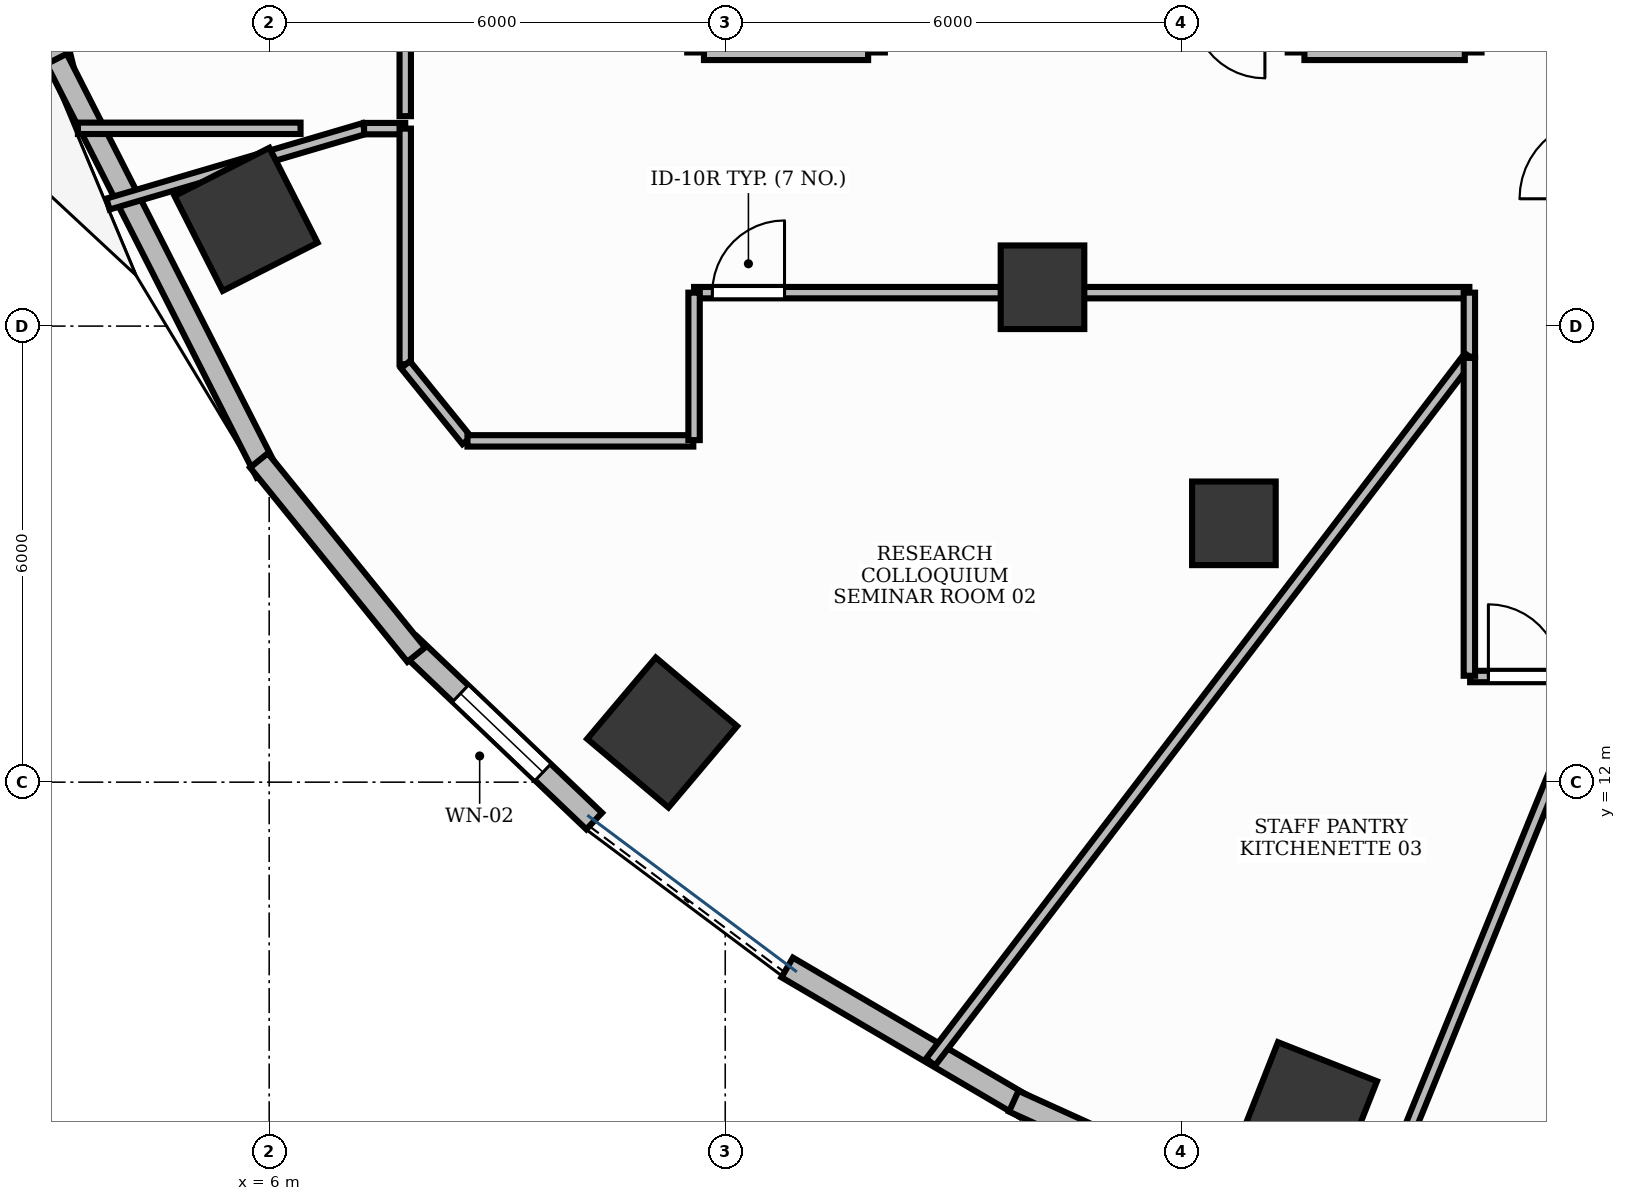
"""IFC4 building model, lengths in metres.
Left out: names, types, materials, properties, quantities, classifications, styles, units other than length and angle.
Written with IfcOpenShell. Run it as: python <this file> out.ifc"""

import sys

from ifc_helpers import new_model, si_unit, direction, frame, frame_2d, origin, origin_2d, place, context, subcontext, project, spatial, rectangle, extrude, element, fill, save


model = new_model("IFC4")
c1 = context("Model", 3, precision=1e-05, world=origin(), true_north=direction((0.0, 1.0)))
c2 = subcontext(c1, "Body", "Model", "MODEL_VIEW")
j1 = project(units=[si_unit("LENGTHUNIT", "METRE"), si_unit("PLANEANGLEUNIT", "RADIAN")], contexts=[c1])
p1 = place(None, origin())
s1 = spatial("IfcSite", under=j1, at=p1, CompositionType="ELEMENT")
p2 = place(p1, origin())
s2 = spatial("IfcBuilding", under=s1, at=p2, CompositionType="ELEMENT")
p3 = place(p2, frame((0.0, 0.0, 38.4)))
s3 = spatial("IfcBuildingStorey", under=s2, at=p3, CompositionType="ELEMENT", Elevation=38.4)
p4 = place(p3, frame((5.696, 19.404, -0.0), z_axis=(0.0, 0.0, 1.0), x_axis=(-0.453057191132, 0.891481453292, 0.0)))
e1 = element("IfcColumn", 1, at=p4, inside=s3, PredefinedType="COLUMN", context=c2, shape_type="SweptSolid", body=[
    extrude(rectangle(XDim=1.4, YDim=1.4, at=origin_2d()), origin(), (0.0, 0.0, 1.0), 3.901),
])
p5 = place(p3, frame((16.174, 18.511, -0.0), z_axis=(0.0, 0.0, 1.0), x_axis=(1.0, 0.0, 0.0)))
e2 = element("IfcColumn", 2, at=p5, inside=s3, PredefinedType="COLUMN", context=c2, shape_type="SweptSolid", body=[
    extrude(rectangle(XDim=1.1, YDim=1.1, at=origin_2d()), origin(), (0.0, 0.0, 1.0), 3.901),
])
p6 = place(p3, frame((11.17, 12.653, -0.0), z_axis=(0.0, 0.0, 1.0), x_axis=(-0.764246456939, 0.644924300253, 0.0)))
e3 = element("IfcColumn", 3, at=p6, inside=s3, PredefinedType="COLUMN", context=c2, shape_type="SweptSolid", body=[
    extrude(rectangle(XDim=1.4, YDim=1.4, at=origin_2d()), origin(), (0.0, 0.0, 1.0), 3.901),
])
p7 = place(p3, frame((18.692, 15.405, -0.0), z_axis=(0.0, 0.0, 1.0), x_axis=(1.0, 0.0, 0.0)))
e4 = element("IfcColumn", 4, at=p7, inside=s3, PredefinedType="COLUMN", context=c2, shape_type="SweptSolid", body=[
    extrude(rectangle(XDim=1.1, YDim=1.1, at=origin_2d()), origin(), (0.0, 0.0, 1.0), 3.901),
])
p8 = place(p3, frame((19.667, 7.671, -0.0), z_axis=(0.0, 0.0, 1.0), x_axis=(-0.930225540858, 0.366988341962, 0.0)))
e5 = element("IfcColumn", 5, at=p8, inside=s3, PredefinedType="COLUMN", context=c2, shape_type="SweptSolid", body=[
    extrude(rectangle(XDim=1.4, YDim=1.4, at=origin_2d()), origin(), (0.0, 0.0, 1.0), 3.901),
])
p9 = place(p3, frame((2.571, 24.266, 0.0), z_axis=(0.0, 0.0, 1.0), x_axis=(0.238522035896, -0.971137085273, 0.0)))
e6 = element("IfcWall", 6, at=p9, inside=s3, PredefinedType="STANDARD", context=c2, shape_type="SweptSolid", body=[
    extrude(rectangle(XDim=2.993, YDim=0.3, at=frame_2d((1.497, 0.0))), origin(), (0.0, 0.0, 1.0), 3.9),
])
p10 = place(p9, frame((0.946, 0.0, 0.0)))
e7 = element("IfcOpeningElement", 7, at=p10, cuts=e6, PredefinedType="OPENING", context=c2, shape_type="SweptSolid", body=[
    extrude(rectangle(XDim=1.1, YDim=2.15, at=frame_2d((0.55, 1.075))), frame((0.0, 0.165, 0.0), z_axis=(0.0, -1.0, 0.0), x_axis=(1.0, 0.0, 0.0)), (0.0, 0.0, 1.0), 0.33),
])
p11 = place(p3, frame((7.842, 13.809, 0.0), z_axis=(0.0, 0.0, 1.0), x_axis=(0.723678516117, -0.690137236578, 0.0)))
e8 = element("IfcWall", 8, at=p11, inside=s3, PredefinedType="STANDARD", context=c2, shape_type="SweptSolid", body=[
    extrude(rectangle(XDim=3.363, YDim=0.3, at=frame_2d((1.681, 0.0))), origin(), (0.0, 0.0, 1.0), 3.9),
])
p12 = place(p11, frame((0.931, 0.0, 0.95)))
e9 = element("IfcOpeningElement", 9, at=p12, cuts=e8, PredefinedType="OPENING", context=c2, shape_type="SweptSolid", body=[
    extrude(rectangle(XDim=1.5, YDim=1.8, at=frame_2d((0.75, 0.9))), frame((0.0, 0.165, 0.0), z_axis=(0.0, -1.0, 0.0), x_axis=(1.0, 0.0, 0.0)), (0.0, 0.0, 1.0), 0.33),
])
p13 = place(p3, frame((3.204, 21.514, 0.0), z_axis=(0.0, 0.0, 1.0), x_axis=(0.453093111502, -0.891463197395, 0.0)))
e10 = element("IfcWall", 10, at=p13, inside=s3, PredefinedType="STANDARD", context=c2, shape_type="SweptSolid", body=[
    extrude(rectangle(XDim=6.102, YDim=0.3, at=frame_2d((3.051, 0.0))), origin(), (0.0, 0.0, 1.0), 3.9),
])
p14 = place(p3, frame((5.866, 16.233, 0.0), z_axis=(0.0, 0.0, 1.0), x_axis=(0.629221727718, -0.777225847079, 0.0)))
e11 = element("IfcWall", 11, at=p14, inside=s3, PredefinedType="STANDARD", context=c2, shape_type="SweptSolid", body=[
    extrude(rectangle(XDim=3.288, YDim=0.3, at=frame_2d((1.644, 0.0))), origin(), (0.0, 0.0, 1.0), 3.9),
])
p15 = place(p3, frame((12.815, 9.562, 0.0), z_axis=(0.0, 0.0, 1.0), x_axis=(0.8624654944, -0.506115867139, 0.0)))
e12 = element("IfcWall", 12, at=p15, inside=s3, PredefinedType="STANDARD", context=c2, shape_type="SweptSolid", body=[
    extrude(rectangle(XDim=3.635, YDim=0.3, at=frame_2d((1.818, 0.0))), origin(), (0.0, 0.0, 1.0), 3.9),
])
p16 = place(p3, frame((15.796, 7.802, 0.0), z_axis=(0.0, 0.0, 1.0), x_axis=(0.910623406862, -0.413237233166, 0.0)))
e13 = element("IfcWall", 13, at=p16, inside=s3, PredefinedType="STANDARD", context=c2, shape_type="SweptSolid", body=[
    extrude(rectangle(XDim=3.74, YDim=0.3, at=frame_2d((1.87, 0.0))), origin(), (0.0, 0.0, 1.0), 3.9),
])
p17 = place(p3, frame((11.72, 21.6, 0.0), z_axis=(0.0, 0.0, 1.0), x_axis=(1.0, 0.0, 0.0)))
e14 = element("IfcWall", 14, at=p17, inside=s3, PredefinedType="PARTITIONING", context=c2, shape_type="SweptSolid", body=[
    extrude(rectangle(XDim=2.16, YDim=0.2, at=frame_2d((1.08, 0.0))), origin(), (0.0, 0.0, 1.0), 2.91),
])
p18 = place(p3, frame((19.62, 21.6, 0.0), z_axis=(0.0, 0.0, 1.0), x_axis=(1.0, 0.0, 0.0)))
e15 = element("IfcWall", 15, at=p18, inside=s3, PredefinedType="PARTITIONING", context=c2, shape_type="SweptSolid", body=[
    extrude(rectangle(XDim=2.11, YDim=0.2, at=frame_2d((1.055, 0.0))), origin(), (0.0, 0.0, 1.0), 2.91),
])
p19 = place(p3, frame((11.59, 18.44, 0.0), z_axis=(0.0, 0.0, 1.0), x_axis=(1.0, 0.0, 0.0)))
e16 = element("IfcWall", 16, at=p19, inside=s3, PredefinedType="PARTITIONING", context=c2, shape_type="SweptSolid", body=[
    extrude(rectangle(XDim=10.2, YDim=0.15, at=frame_2d((5.1, 0.0))), origin(), (0.0, 0.0, 1.0), 2.91),
])
p20 = place(p19, frame((0.24, 0.0, 0.0)))
e17 = element("IfcOpeningElement", 17, at=p20, cuts=e16, PredefinedType="OPENING", context=c2, shape_type="SweptSolid", body=[
    extrude(rectangle(XDim=0.95, YDim=2.15, at=frame_2d((0.475, 1.075))), frame((0.0, 0.09, 0.0), z_axis=(0.0, -1.0, 0.0), x_axis=(1.0, 0.0, 0.0)), (0.0, 0.0, 1.0), 0.18),
])
p21 = place(p3, frame((21.8, 13.39, 0.0), z_axis=(0.0, 0.0, 1.0), x_axis=(1.0, 0.0, 0.0)))
e18 = element("IfcWall", 18, at=p21, inside=s3, PredefinedType="PARTITIONING", context=c2, shape_type="SweptSolid", body=[
    extrude(rectangle(XDim=1.629, YDim=0.15, at=frame_2d((0.814, 0.0))), origin(), (0.0, 0.0, 1.0), 2.91),
])
p22 = place(p21, frame((0.24, 0.0, 0.0)))
e19 = element("IfcOpeningElement", 19, at=p22, cuts=e18, PredefinedType="OPENING", context=c2, shape_type="SweptSolid", body=[
    extrude(rectangle(XDim=0.95, YDim=2.15, at=frame_2d((0.475, 1.075))), frame((0.0, 0.09, 0.0), z_axis=(0.0, -1.0, 0.0), x_axis=(1.0, 0.0, 0.0)), (0.0, 0.0, 1.0), 0.18),
])
p23 = place(p3, frame((7.79, 36.501, 0.0), z_axis=(0.0, 0.0, 1.0), x_axis=(0.0, -1.0, 0.0)))
e20 = element("IfcWall", 20, at=p23, inside=s3, PredefinedType="PARTITIONING", context=c2, shape_type="SweptSolid", body=[
    extrude(rectangle(XDim=15.74, YDim=0.15, at=frame_2d((7.87, 0.0))), origin(), (0.0, 0.0, 1.0), 2.91),
])
p24 = place(p23, frame((5.023, 0.0, 0.0)))
e21 = element("IfcOpeningElement", 21, at=p24, cuts=e20, PredefinedType="OPENING", context=c2, shape_type="SweptSolid", body=[
    extrude(rectangle(XDim=0.95, YDim=2.15, at=frame_2d((0.475, 1.075))), frame((0.0, 0.09, 0.0), z_axis=(0.0, -1.0, 0.0), x_axis=(1.0, 0.0, 0.0)), (0.0, 0.0, 1.0), 0.18),
])
p25 = place(p3, frame((3.879, 19.605, 0.0), z_axis=(0.0, 0.0, 1.0), x_axis=(0.959249199887, 0.282561449097, 0.0)))
e22 = element("IfcWall", 22, at=p25, inside=s3, PredefinedType="PARTITIONING", context=c2, shape_type="SweptSolid", body=[
    extrude(rectangle(XDim=3.512, YDim=0.15, at=frame_2d((1.756, 0.0))), origin(), (0.0, 0.0, 1.0), 2.91),
])
p26 = place(p3, frame((7.249, 20.598, 0.0), z_axis=(0.0, 0.0, 1.0), x_axis=(1.0, 0.0, 0.0)))
e23 = element("IfcWall", 23, at=p26, inside=s3, PredefinedType="PARTITIONING", context=c2, shape_type="SweptSolid", body=[
    extrude(rectangle(XDim=0.542, YDim=0.15, at=frame_2d((0.271, 0.0))), origin(), (0.0, 0.0, 1.0), 2.91),
])
p27 = place(p3, frame((7.79, 20.598, 0.0), z_axis=(0.0, 0.0, 1.0), x_axis=(0.0, -1.0, 0.0)))
e24 = element("IfcWall", 24, at=p27, inside=s3, PredefinedType="PARTITIONING", context=c2, shape_type="SweptSolid", body=[
    extrude(rectangle(XDim=3.099, YDim=0.15, at=frame_2d((1.55, 0.0))), origin(), (0.0, 0.0, 1.0), 2.91),
])
p28 = place(p3, frame((7.792, 17.492, 0.0), z_axis=(0.0, 0.0, 1.0), x_axis=(0.629225554682, -0.777222748854, 0.0)))
e25 = element("IfcWall", 25, at=p28, inside=s3, PredefinedType="PARTITIONING", context=c2, shape_type="SweptSolid", body=[
    extrude(rectangle(XDim=1.285, YDim=0.15, at=frame_2d((0.643, 0.0))), origin(), (0.0, 0.0, 1.0), 2.91),
])
p29 = place(p3, frame((8.609, 16.49, 0.0), z_axis=(0.0, 0.0, 1.0), x_axis=(1.0, 0.0, 0.0)))
e26 = element("IfcWall", 26, at=p29, inside=s3, PredefinedType="PARTITIONING", context=c2, shape_type="SweptSolid", body=[
    extrude(rectangle(XDim=2.971, YDim=0.15, at=frame_2d((1.486, 0.0))), origin(), (0.0, 0.0, 1.0), 2.91),
])
p30 = place(p3, frame((11.59, 16.5, 0.0), z_axis=(0.0, 0.0, 1.0), x_axis=(0.0, 1.0, 0.0)))
e27 = element("IfcWall", 27, at=p30, inside=s3, PredefinedType="PARTITIONING", context=c2, shape_type="SweptSolid", body=[
    extrude(rectangle(XDim=1.94, YDim=0.15, at=frame_2d((0.97, 0.0))), origin(), (0.0, 0.0, 1.0), 2.91),
])
p31 = place(p3, frame((21.79, 18.44, 0.0), z_axis=(0.0, 0.0, 1.0), x_axis=(0.0, -1.0, 0.0)))
e28 = element("IfcWall", 28, at=p31, inside=s3, PredefinedType="PARTITIONING", context=c2, shape_type="SweptSolid", body=[
    extrude(rectangle(XDim=0.842, YDim=0.15, at=frame_2d((0.421, 0.0))), origin(), (0.0, 0.0, 1.0), 2.91),
])
p32 = place(p3, frame((21.79, 17.598, 0.0), z_axis=(0.0, 0.0, 1.0), x_axis=(-0.606985155119, -0.794713169304, 0.0)))
e29 = element("IfcWall", 29, at=p32, inside=s3, PredefinedType="PARTITIONING", context=c2, shape_type="SweptSolid", body=[
    extrude(rectangle(XDim=11.677, YDim=0.15, at=frame_2d((5.839, 0.0))), origin(), (0.0, 0.0, 1.0), 2.91),
])
p33 = place(p3, frame((21.79, 17.581, 0.0), z_axis=(0.0, 0.0, 1.0), x_axis=(0.0, -1.0, 0.0)))
e30 = element("IfcWall", 30, at=p33, inside=s3, PredefinedType="PARTITIONING", context=c2, shape_type="SweptSolid", body=[
    extrude(rectangle(XDim=4.181, YDim=0.15, at=frame_2d((2.091, 0.0))), origin(), (0.0, 0.0, 1.0), 2.91),
])
p34 = place(p3, frame((23.429, 13.39, 0.0), z_axis=(0.0, 0.0, 1.0), x_axis=(-0.377151920135, -0.926151407243, 0.0)))
e31 = element("IfcWall", 31, at=p34, inside=s3, PredefinedType="PARTITIONING", context=c2, shape_type="SweptSolid", body=[
    extrude(rectangle(XDim=8.239, YDim=0.15, at=frame_2d((4.119, 0.0))), origin(), (0.0, 0.0, 1.0), 2.91),
])
p35 = place(p3, frame((6.413, 20.602, 0.0), z_axis=(0.0, 0.0, 1.0), x_axis=(-1.0, 0.0, 0.0)))
e32 = element("IfcWall", 32, at=p35, inside=s3, PredefinedType="PARTITIONING", context=c2, shape_type="SweptSolid", body=[
    extrude(rectangle(XDim=2.929, YDim=0.15, at=frame_2d((1.464, 0.0))), origin(), (0.0, 0.0, 1.0), 2.91),
])
p36 = place(p12, origin())
e33 = element("IfcWindow", 33, at=p36, inside=s3, PartitioningType="DOUBLE_PANEL_VERTICAL", PredefinedType="WINDOW", context=c2, shape_type="SweptSolid", body=[
    extrude(rectangle(XDim=1.5, YDim=1.8, at=frame_2d((0.75, 0.9))), frame((0.0, 0.03, 0.0), z_axis=(0.0, -1.0, 0.0), x_axis=(1.0, 0.0, 0.0)), (0.0, 0.0, 1.0), 0.06),
])
fill(e9, e33)
p37 = place(p20, origin())
e34 = element("IfcDoor", 34, at=p37, inside=s3, OperationType="SINGLE_SWING_RIGHT", PredefinedType="DOOR", context=c2, shape_type="SweptSolid", body=[
    extrude(rectangle(XDim=0.95, YDim=2.15, at=frame_2d((0.475, 1.075))), frame((0.0, 0.025, 0.0), z_axis=(0.0, -1.0, 0.0), x_axis=(1.0, 0.0, 0.0)), (0.0, 0.0, 1.0), 0.05),
])
fill(e17, e34)
p38 = place(p22, origin())
e35 = element("IfcDoor", 35, at=p38, inside=s3, OperationType="SINGLE_SWING_LEFT", PredefinedType="DOOR", context=c2, shape_type="SweptSolid", body=[
    extrude(rectangle(XDim=0.95, YDim=2.15, at=frame_2d((0.475, 1.075))), frame((0.0, 0.025, 0.0), z_axis=(0.0, -1.0, 0.0), x_axis=(1.0, 0.0, 0.0)), (0.0, 0.0, 1.0), 0.05),
])
fill(e19, e35)
save(model, sys.argv[1])
